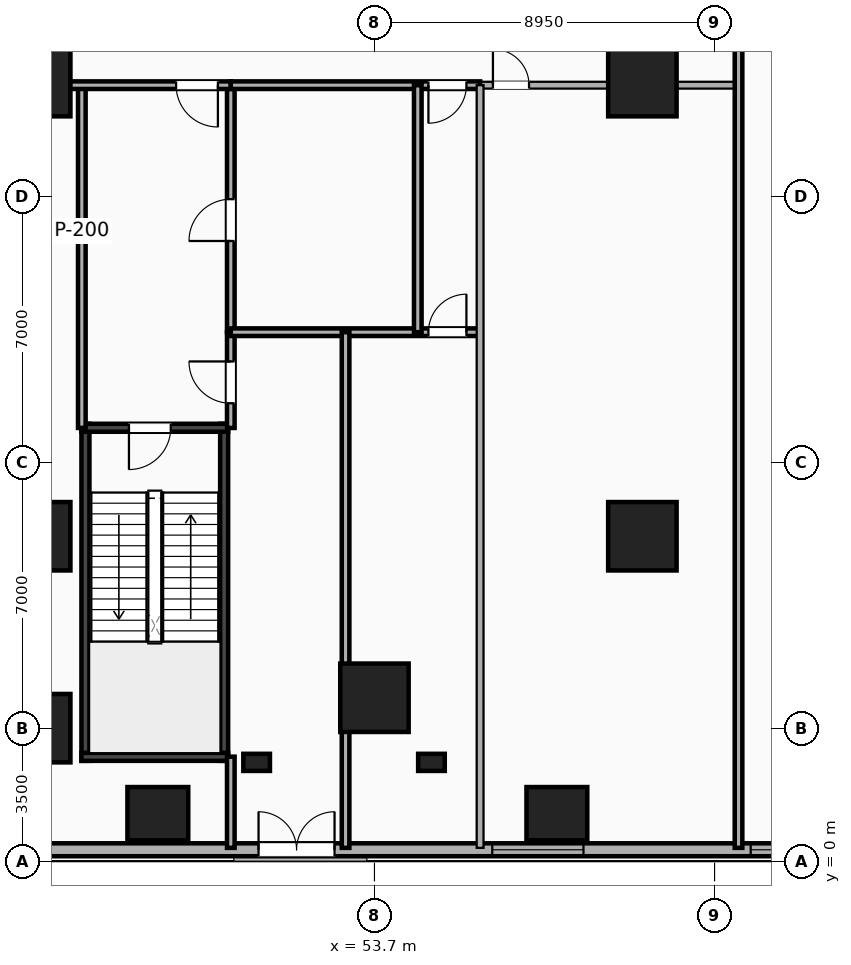
"""IFC4 building model, lengths in metres.
Left out: names, types, materials, properties, quantities, classifications, styles, units other than length and angle.
Written with IfcOpenShell. Run it as: python <this file> out.ifc"""

import sys

from ifc_helpers import new_model, si_unit, direction, frame, frame_2d, origin, origin_2d, place, context, subcontext, project, spatial, rectangle, extrude, element, fill, save


model = new_model("IFC4")
c1 = context("Model", 3, precision=1e-05, world=origin(), true_north=direction((0.0, 1.0)))
c2 = subcontext(c1, "Body", "Model", "MODEL_VIEW")
j1 = project(units=[si_unit("LENGTHUNIT", "METRE"), si_unit("PLANEANGLEUNIT", "RADIAN")], contexts=[c1])
p1 = place(None, origin())
s1 = spatial("IfcSite", under=j1, at=p1, CompositionType="ELEMENT")
p2 = place(p1, origin())
s2 = spatial("IfcBuilding", under=s1, at=p2, CompositionType="ELEMENT")
p3 = place(p2, origin())
s3 = spatial("IfcBuildingStorey", under=s2, at=p3, CompositionType="ELEMENT", Elevation=0.0)
for number, where, z_axis, x_axis in (
    (1, (46.095, 2.64, 0.0), (0.0, 0.0, 1.0), (0.0, 1.0, 0.0)),
    (2, (49.745, 2.64, 0.0), (0.0, 0.0, 1.0), (0.0, 1.0, 0.0)),
):
    element("IfcWall", number, at=place(p3, frame(where, z_axis=z_axis, x_axis=x_axis)), inside=s3, PredefinedType="SHEAR", context=c2, shape_type="SweptSolid", body=[
        extrude(rectangle(XDim=8.87, YDim=0.21, at=frame_2d((4.435, 0.0))), origin(), (0.0, 0.0, 1.0), 5.1),
    ])
p4 = place(p3, frame((45.99, 2.745, 0.0), z_axis=(0.0, 0.0, 1.0), x_axis=(1.0, 0.0, 0.0)))
e3 = element("IfcWall", 3, at=p4, inside=s3, PredefinedType="SHEAR", context=c2, shape_type="SweptSolid", body=[
    extrude(rectangle(XDim=3.86, YDim=0.21, at=frame_2d((1.93, 0.0))), origin(), (0.0, 0.0, 1.0), 5.1),
])
p5 = place(p3, frame((45.99, 11.405, 0.0), z_axis=(0.0, 0.0, 1.0), x_axis=(1.0, 0.0, 0.0)))
e4 = element("IfcWall", 4, at=p5, inside=s3, PredefinedType="SHEAR", context=c2, shape_type="SweptSolid", body=[
    extrude(rectangle(XDim=3.86, YDim=0.21, at=frame_2d((1.93, 0.0))), origin(), (0.0, 0.0, 1.0), 5.1),
])
p6 = place(p5, frame((1.25, 0.0, 0.0)))
e5 = element("IfcOpeningElement", 5, at=p6, cuts=e4, PredefinedType="OPENING", context=c2, shape_type="SweptSolid", body=[
    extrude(rectangle(XDim=1.1, YDim=2.15, at=frame_2d((0.55, 1.075))), frame((0.0, 0.115, 0.0), z_axis=(0.0, -1.0, 0.0), x_axis=(1.0, 0.0, 0.0)), (0.0, 0.0, 1.0), 0.23),
])
for number, where, z_axis, x_axis in (
    (6, (50.6, 2.6, -0.35), (0.0, 0.0, 1.0), (1.0, 0.0, 0.0)),
    (7, (55.2, 2.6, -0.35), (0.0, 0.0, 1.0), (1.0, 0.0, 0.0)),
):
    element("IfcColumn", number, at=place(p3, frame(where, z_axis=z_axis, x_axis=x_axis)), inside=s3, PredefinedType="PILASTER", context=c2, shape_type="SweptSolid", body=[
        extrude(rectangle(XDim=0.7, YDim=0.45, at=origin_2d()), origin(), (0.0, 0.0, 1.0), 5.45),
    ])
for number, where, z_axis, x_axis in (
    (8, (44.8, 3.5, -0.35), (0.0, 0.0, 1.0), (1.0, 0.0, 0.0)),
    (9, (44.8, 8.55, -0.35), (0.0, 0.0, 1.0), (1.0, 0.0, 0.0)),
    (10, (44.8, 20.5, -0.35), (0.0, 0.0, 1.0), (1.0, 0.0, 0.0)),
    (11, (60.75, 8.55, -0.35), (0.0, 0.0, 1.0), (1.0, 0.0, 0.0)),
    (12, (60.75, 20.5, -0.35), (0.0, 0.0, 1.0), (1.0, 0.0, 0.0)),
    (13, (53.7, 4.3, -0.35), (0.0, 0.0, 1.0), (1.0, 0.0, 0.0)),
):
    element("IfcColumn", number, at=place(p3, frame(where, z_axis=z_axis, x_axis=x_axis)), inside=s3, PredefinedType="COLUMN", context=c2, shape_type="SweptSolid", body=[
        extrude(rectangle(XDim=1.8, YDim=1.8, at=origin_2d()), origin(), (0.0, 0.0, 1.0), 5.45),
    ])
for number, where, z_axis, x_axis in (
    (14, (48.0, 1.25, -0.35), (0.0, 0.0, 1.0), (1.0, 0.0, 0.0)),
    (15, (58.5, 1.25, -0.35), (0.0, 0.0, 1.0), (1.0, 0.0, 0.0)),
):
    element("IfcColumn", number, at=place(p3, frame(where, z_axis=z_axis, x_axis=x_axis)), inside=s3, PredefinedType="COLUMN", context=c2, shape_type="SweptSolid", body=[
        extrude(rectangle(XDim=1.6, YDim=1.4, at=origin_2d()), origin(), (0.0, 0.0, 1.0), 5.45),
    ])
p7 = place(p3, frame((-4.7, 0.3, 0.0), z_axis=(0.0, 0.0, 1.0), x_axis=(1.0, 0.0, 0.0)))
e16 = element("IfcWall", 16, at=p7, inside=s3, PredefinedType="SOLIDWALL", context=c2, shape_type="SweptSolid", body=[
    extrude(rectangle(XDim=83.4, YDim=0.34, at=frame_2d((41.7, 0.0))), origin(), (0.0, 0.0, 1.0), 5.1),
])
p8 = place(p7, frame((24.78, 0.0, 0.0), z_axis=(0.0, 0.0, 1.0), x_axis=(-1.0, 0.0, 0.0)))
e17 = element("IfcOpeningElement", 17, at=p8, cuts=e16, PredefinedType="OPENING", context=c2, shape_type="SweptSolid", body=[
    extrude(rectangle(XDim=2.0, YDim=2.4, at=frame_2d((1.0, 1.2))), frame((0.0, 0.18, 0.0), z_axis=(0.0, -1.0, 0.0), x_axis=(1.0, 0.0, 0.0)), (0.0, 0.0, 1.0), 0.36),
])
p9 = place(p7, frame((38.85, 0.0, 0.0), z_axis=(0.0, 0.0, 1.0), x_axis=(-1.0, 0.0, 0.0)))
e18 = element("IfcOpeningElement", 18, at=p9, cuts=e16, PredefinedType="OPENING", context=c2, shape_type="SweptSolid", body=[
    extrude(rectangle(XDim=2.0, YDim=2.4, at=frame_2d((1.0, 1.2))), frame((0.0, 0.18, 0.0), z_axis=(0.0, -1.0, 0.0), x_axis=(1.0, 0.0, 0.0)), (0.0, 0.0, 1.0), 0.36),
])
p10 = place(p7, frame((57.35, 0.0, 0.0), z_axis=(0.0, 0.0, 1.0), x_axis=(-1.0, 0.0, 0.0)))
e19 = element("IfcOpeningElement", 19, at=p10, cuts=e16, PredefinedType="OPENING", context=c2, shape_type="SweptSolid", body=[
    extrude(rectangle(XDim=2.0, YDim=2.4, at=frame_2d((1.0, 1.2))), frame((0.0, 0.18, 0.0), z_axis=(0.0, -1.0, 0.0), x_axis=(1.0, 0.0, 0.0)), (0.0, 0.0, 1.0), 0.36),
])
p11 = place(p7, frame((81.0, 0.0, 0.0), z_axis=(0.0, 0.0, 1.0), x_axis=(-1.0, 0.0, 0.0)))
e20 = element("IfcOpeningElement", 20, at=p11, cuts=e16, PredefinedType="OPENING", context=c2, shape_type="SweptSolid", body=[
    extrude(rectangle(XDim=3.8, YDim=3.4, at=frame_2d((1.9, 1.7))), frame((0.0, 0.18, 0.0), z_axis=(0.0, -1.0, 0.0), x_axis=(1.0, 0.0, 0.0)), (0.0, 0.0, 1.0), 0.36),
])
p12 = place(p7, frame((9.9, 0.0, 0.9)))
e21 = element("IfcOpeningElement", 21, at=p12, cuts=e16, PredefinedType="OPENING", context=c2, shape_type="SweptSolid", body=[
    extrude(rectangle(XDim=2.4, YDim=2.6, at=frame_2d((1.2, 1.3))), frame((0.0, 0.18, 0.0), z_axis=(0.0, -1.0, 0.0), x_axis=(1.0, 0.0, 0.0)), (0.0, 0.0, 1.0), 0.36),
])
p13 = place(p7, frame((14.3, 0.0, 0.9)))
e22 = element("IfcOpeningElement", 22, at=p13, cuts=e16, PredefinedType="OPENING", context=c2, shape_type="SweptSolid", body=[
    extrude(rectangle(XDim=2.4, YDim=2.6, at=frame_2d((1.2, 1.3))), frame((0.0, 0.18, 0.0), z_axis=(0.0, -1.0, 0.0), x_axis=(1.0, 0.0, 0.0)), (0.0, 0.0, 1.0), 0.36),
])
p14 = place(p7, frame((27.5, 0.0, 0.9)))
e23 = element("IfcOpeningElement", 23, at=p14, cuts=e16, PredefinedType="OPENING", context=c2, shape_type="SweptSolid", body=[
    extrude(rectangle(XDim=2.4, YDim=2.6, at=frame_2d((1.2, 1.3))), frame((0.0, 0.18, 0.0), z_axis=(0.0, -1.0, 0.0), x_axis=(1.0, 0.0, 0.0)), (0.0, 0.0, 1.0), 0.36),
])
p15 = place(p7, frame((45.9, 0.0, 0.9)))
e24 = element("IfcOpeningElement", 24, at=p15, cuts=e16, PredefinedType="OPENING", context=c2, shape_type="SweptSolid", body=[
    extrude(rectangle(XDim=2.4, YDim=2.6, at=frame_2d((1.2, 1.3))), frame((0.0, 0.18, 0.0), z_axis=(0.0, -1.0, 0.0), x_axis=(1.0, 0.0, 0.0)), (0.0, 0.0, 1.0), 0.36),
])
p16 = place(p7, frame((61.5, 0.0, 0.9)))
e25 = element("IfcOpeningElement", 25, at=p16, cuts=e16, PredefinedType="OPENING", context=c2, shape_type="SweptSolid", body=[
    extrude(rectangle(XDim=2.4, YDim=2.6, at=frame_2d((1.2, 1.3))), frame((0.0, 0.18, 0.0), z_axis=(0.0, -1.0, 0.0), x_axis=(1.0, 0.0, 0.0)), (0.0, 0.0, 1.0), 0.36),
])
p17 = place(p7, frame((68.3, 0.0, 0.9)))
e26 = element("IfcOpeningElement", 26, at=p17, cuts=e16, PredefinedType="OPENING", context=c2, shape_type="SweptSolid", body=[
    extrude(rectangle(XDim=2.4, YDim=2.6, at=frame_2d((1.2, 1.3))), frame((0.0, 0.18, 0.0), z_axis=(0.0, -1.0, 0.0), x_axis=(1.0, 0.0, 0.0)), (0.0, 0.0, 1.0), 0.36),
])
p18 = place(p3, frame((56.48, 20.42, 0.0), z_axis=(0.0, 0.0, 1.0), x_axis=(1.0, 0.0, 0.0)))
e27 = element("IfcWall", 27, at=p18, inside=s3, PredefinedType="PARTITIONING", context=c2, shape_type="SweptSolid", body=[
    extrude(rectangle(XDim=6.8, YDim=0.18, at=frame_2d((3.4, 0.0))), origin(), (0.0, 0.0, 1.0), 4.164),
])
p19 = place(p18, frame((1.288, 0.0, 0.0), z_axis=(0.0, 0.0, 1.0), x_axis=(-1.0, 0.0, 0.0)))
e28 = element("IfcOpeningElement", 28, at=p19, cuts=e27, PredefinedType="OPENING", context=c2, shape_type="SweptSolid", body=[
    extrude(rectangle(XDim=0.95, YDim=2.15, at=frame_2d((0.475, 1.075))), frame((0.0, 0.1, 0.0), z_axis=(0.0, -1.0, 0.0), x_axis=(1.0, 0.0, 0.0)), (0.0, 0.0, 1.0), 0.2),
])
p20 = place(p3, frame((46.0, 11.4, 0.0), z_axis=(0.0, 0.0, 1.0), x_axis=(0.0, 1.0, 0.0)))
e29 = element("IfcWall", 29, at=p20, inside=s3, PredefinedType="PARTITIONING", context=c2, shape_type="SweptSolid", body=[
    extrude(rectangle(XDim=9.02, YDim=0.2, at=frame_2d((4.51, 0.0))), origin(), (0.0, 0.0, 1.0), 4.164),
])
p21 = place(p3, frame((49.92, 11.4, 0.0), z_axis=(0.0, 0.0, 1.0), x_axis=(0.0, 1.0, 0.0)))
e30 = element("IfcWall", 30, at=p21, inside=s3, PredefinedType="PARTITIONING", context=c2, shape_type="SweptSolid", body=[
    extrude(rectangle(XDim=2.52, YDim=0.2, at=frame_2d((1.26, 0.0))), origin(), (0.0, 0.0, 1.0), 5.1),
])
p22 = place(p21, frame((1.75, 0.0, 0.0), z_axis=(0.0, 0.0, 1.0), x_axis=(-1.0, 0.0, 0.0)))
e31 = element("IfcOpeningElement", 31, at=p22, cuts=e30, PredefinedType="OPENING", context=c2, shape_type="SweptSolid", body=[
    extrude(rectangle(XDim=1.1, YDim=2.15, at=frame_2d((0.55, 1.075))), frame((0.0, 0.11, 0.0), z_axis=(0.0, -1.0, 0.0), x_axis=(1.0, 0.0, 0.0)), (0.0, 0.0, 1.0), 0.22),
])
p23 = place(p3, frame((49.92, 13.92, 0.0), z_axis=(0.0, 0.0, 1.0), x_axis=(0.0, 1.0, 0.0)))
e32 = element("IfcWall", 32, at=p23, inside=s3, PredefinedType="PARTITIONING", context=c2, shape_type="SweptSolid", body=[
    extrude(rectangle(XDim=6.5, YDim=0.2, at=frame_2d((3.25, 0.0))), origin(), (0.0, 0.0, 1.0), 4.164),
])
p24 = place(p23, frame((3.5, 0.0, 0.0), z_axis=(0.0, 0.0, 1.0), x_axis=(-1.0, 0.0, 0.0)))
e33 = element("IfcOpeningElement", 33, at=p24, cuts=e32, PredefinedType="OPENING", context=c2, shape_type="SweptSolid", body=[
    extrude(rectangle(XDim=1.1, YDim=2.15, at=frame_2d((0.55, 1.075))), frame((0.0, 0.11, 0.0), z_axis=(0.0, -1.0, 0.0), x_axis=(1.0, 0.0, 0.0)), (0.0, 0.0, 1.0), 0.22),
])
p25 = place(p3, frame((49.92, 0.35, 0.0), z_axis=(0.0, 0.0, 1.0), x_axis=(0.0, 1.0, 0.0)))
e34 = element("IfcWall", 34, at=p25, inside=s3, PredefinedType="PARTITIONING", context=c2, shape_type="SweptSolid", body=[
    extrude(rectangle(XDim=2.4, YDim=0.2, at=frame_2d((1.2, 0.0))), origin(), (0.0, 0.0, 1.0), 4.164),
])
p26 = place(p3, frame((44.8, 20.42, 0.0), z_axis=(0.0, 0.0, 1.0), x_axis=(1.0, 0.0, 0.0)))
e35 = element("IfcWall", 35, at=p26, inside=s3, PredefinedType="PARTITIONING", context=c2, shape_type="SweptSolid", body=[
    extrude(rectangle(XDim=5.12, YDim=0.2, at=frame_2d((2.56, 0.0))), origin(), (0.0, 0.0, 1.0), 4.164),
])
p27 = place(p26, frame((3.681, 0.0, 0.0)))
e36 = element("IfcOpeningElement", 36, at=p27, cuts=e35, PredefinedType="OPENING", context=c2, shape_type="SweptSolid", body=[
    extrude(rectangle(XDim=1.1, YDim=2.15, at=frame_2d((0.55, 1.075))), frame((0.0, 0.11, 0.0), z_axis=(0.0, -1.0, 0.0), x_axis=(1.0, 0.0, 0.0)), (0.0, 0.0, 1.0), 0.22),
])
p28 = place(p3, frame((49.92, 20.42, 0.0), z_axis=(0.0, 0.0, 1.0), x_axis=(1.0, 0.0, 0.0)))
e37 = element("IfcWall", 37, at=p28, inside=s3, PredefinedType="PARTITIONING", context=c2, shape_type="SweptSolid", body=[
    extrude(rectangle(XDim=6.56, YDim=0.2, at=frame_2d((3.28, 0.0))), origin(), (0.0, 0.0, 1.0), 4.164),
])
p29 = place(p28, frame((5.2, 0.0, 0.0)))
e38 = element("IfcOpeningElement", 38, at=p29, cuts=e37, PredefinedType="OPENING", context=c2, shape_type="SweptSolid", body=[
    extrude(rectangle(XDim=1.0, YDim=2.15, at=frame_2d((0.5, 1.075))), frame((0.0, 0.11, 0.0), z_axis=(0.0, -1.0, 0.0), x_axis=(1.0, 0.0, 0.0)), (0.0, 0.0, 1.0), 0.22),
])
p30 = place(p3, frame((49.92, 13.92, 0.0), z_axis=(0.0, 0.0, 1.0), x_axis=(1.0, 0.0, 0.0)))
e39 = element("IfcWall", 39, at=p30, inside=s3, PredefinedType="PARTITIONING", context=c2, shape_type="SweptSolid", body=[
    extrude(rectangle(XDim=6.56, YDim=0.2, at=frame_2d((3.28, 0.0))), origin(), (0.0, 0.0, 1.0), 5.1),
])
p31 = place(p30, frame((6.2, 0.0, 0.0), z_axis=(0.0, 0.0, 1.0), x_axis=(-1.0, 0.0, 0.0)))
e40 = element("IfcOpeningElement", 40, at=p31, cuts=e39, PredefinedType="OPENING", context=c2, shape_type="SweptSolid", body=[
    extrude(rectangle(XDim=1.0, YDim=2.15, at=frame_2d((0.5, 1.075))), frame((0.0, 0.11, 0.0), z_axis=(0.0, -1.0, 0.0), x_axis=(1.0, 0.0, 0.0)), (0.0, 0.0, 1.0), 0.22),
])
p32 = place(p3, frame((63.28, 0.35, 0.0), z_axis=(0.0, 0.0, 1.0), x_axis=(0.0, 1.0, 0.0)))
e41 = element("IfcWall", 41, at=p32, inside=s3, PredefinedType="PARTITIONING", context=c2, shape_type="SweptSolid", body=[
    extrude(rectangle(XDim=22.9, YDim=0.2, at=frame_2d((11.45, 0.0))), origin(), (0.0, 0.0, 1.0), 4.164),
])
p33 = place(p32, frame((22.15, 0.0, 0.0), z_axis=(0.0, 0.0, 1.0), x_axis=(-1.0, 0.0, 0.0)))
e42 = element("IfcOpeningElement", 42, at=p33, cuts=e41, PredefinedType="OPENING", context=c2, shape_type="SweptSolid", body=[
    extrude(rectangle(XDim=1.1, YDim=2.15, at=frame_2d((0.55, 1.075))), frame((0.0, 0.11, 0.0), z_axis=(0.0, -1.0, 0.0), x_axis=(1.0, 0.0, 0.0)), (0.0, 0.0, 1.0), 0.22),
])
p34 = place(p3, frame((56.48, 0.35, 0.0), z_axis=(0.0, 0.0, 1.0), x_axis=(0.0, 1.0, 0.0)))
e43 = element("IfcWall", 43, at=p34, inside=s3, PredefinedType="PARTITIONING", context=c2, shape_type="SweptSolid", body=[
    extrude(rectangle(XDim=20.07, YDim=0.18, at=frame_2d((10.035, 0.0))), origin(), (0.0, 0.0, 1.0), 4.164),
])
p35 = place(p3, frame((52.94, 0.35, 0.0), z_axis=(0.0, 0.0, 1.0), x_axis=(0.0, 1.0, 0.0)))
e44 = element("IfcWall", 44, at=p35, inside=s3, PredefinedType="PARTITIONING", context=c2, shape_type="SweptSolid", body=[
    extrude(rectangle(XDim=13.57, YDim=0.2, at=frame_2d((6.785, 0.0))), origin(), (0.0, 0.0, 1.0), 2.735),
])
p36 = place(p3, frame((54.84, 13.92, 0.0), z_axis=(0.0, 0.0, 1.0), x_axis=(0.0, 1.0, 0.0)))
e45 = element("IfcWall", 45, at=p36, inside=s3, PredefinedType="PARTITIONING", context=c2, shape_type="SweptSolid", body=[
    extrude(rectangle(XDim=6.5, YDim=0.2, at=frame_2d((3.25, 0.0))), origin(), (0.0, 0.0, 1.0), 4.164),
])
p37 = place(p10, origin())
e46 = element("IfcDoor", 46, at=p37, inside=s3, OperationType="DOUBLE_DOOR_SINGLE_SWING", PredefinedType="DOOR", context=c2, shape_type="SweptSolid", body=[
    extrude(rectangle(XDim=2.0, YDim=2.4, at=frame_2d((1.0, 1.2))), frame((0.0, 0.025, 0.0), z_axis=(0.0, -1.0, 0.0), x_axis=(1.0, 0.0, 0.0)), (0.0, 0.0, 1.0), 0.05),
])
fill(e19, e46)
p38 = place(p16, origin())
e47 = element("IfcWindow", 47, at=p38, inside=s3, PartitioningType="SINGLE_PANEL", PredefinedType="WINDOW", context=c2, shape_type="SweptSolid", body=[
    extrude(rectangle(XDim=2.4, YDim=2.6, at=frame_2d((1.2, 1.3))), frame((0.0, 0.03, 0.0), z_axis=(0.0, -1.0, 0.0), x_axis=(1.0, 0.0, 0.0)), (0.0, 0.0, 1.0), 0.06),
])
fill(e25, e47)
p39 = place(p17, origin())
e48 = element("IfcWindow", 48, at=p39, inside=s3, PartitioningType="SINGLE_PANEL", PredefinedType="WINDOW", context=c2, shape_type="SweptSolid", body=[
    extrude(rectangle(XDim=2.4, YDim=2.6, at=frame_2d((1.2, 1.3))), frame((0.0, 0.03, 0.0), z_axis=(0.0, -1.0, 0.0), x_axis=(1.0, 0.0, 0.0)), (0.0, 0.0, 1.0), 0.06),
])
fill(e26, e48)
p40 = place(p6, origin())
e49 = element("IfcDoor", 49, at=p40, inside=s3, OperationType="SINGLE_SWING_LEFT", PredefinedType="DOOR", context=c2, shape_type="SweptSolid", body=[
    extrude(rectangle(XDim=1.1, YDim=2.15, at=frame_2d((0.55, 1.075))), frame((0.0, 0.025, 0.0), z_axis=(0.0, -1.0, 0.0), x_axis=(1.0, 0.0, 0.0)), (0.0, 0.0, 1.0), 0.05),
])
fill(e5, e49)
p41 = place(p19, origin())
e50 = element("IfcDoor", 50, at=p41, inside=s3, OperationType="SINGLE_SWING_LEFT", PredefinedType="DOOR", context=c2, shape_type="SweptSolid", body=[
    extrude(rectangle(XDim=0.95, YDim=2.15, at=frame_2d((0.475, 1.075))), frame((0.0, 0.025, 0.0), z_axis=(0.0, -1.0, 0.0), x_axis=(1.0, 0.0, 0.0)), (0.0, 0.0, 1.0), 0.05),
])
fill(e28, e50)
p42 = place(p22, origin())
e51 = element("IfcDoor", 51, at=p42, inside=s3, OperationType="SINGLE_SWING_RIGHT", PredefinedType="DOOR", context=c2, shape_type="SweptSolid", body=[
    extrude(rectangle(XDim=1.1, YDim=2.15, at=frame_2d((0.55, 1.075))), frame((0.0, 0.025, 0.0), z_axis=(0.0, -1.0, 0.0), x_axis=(1.0, 0.0, 0.0)), (0.0, 0.0, 1.0), 0.05),
])
fill(e31, e51)
p43 = place(p24, origin())
e52 = element("IfcDoor", 52, at=p43, inside=s3, OperationType="SINGLE_SWING_LEFT", PredefinedType="DOOR", context=c2, shape_type="SweptSolid", body=[
    extrude(rectangle(XDim=1.1, YDim=2.15, at=frame_2d((0.55, 1.075))), frame((0.0, 0.025, 0.0), z_axis=(0.0, -1.0, 0.0), x_axis=(1.0, 0.0, 0.0)), (0.0, 0.0, 1.0), 0.05),
])
fill(e33, e52)
p44 = place(p27, origin())
e53 = element("IfcDoor", 53, at=p44, inside=s3, OperationType="SINGLE_SWING_RIGHT", PredefinedType="DOOR", context=c2, shape_type="SweptSolid", body=[
    extrude(rectangle(XDim=1.1, YDim=2.15, at=frame_2d((0.55, 1.075))), frame((0.0, 0.025, 0.0), z_axis=(0.0, -1.0, 0.0), x_axis=(1.0, 0.0, 0.0)), (0.0, 0.0, 1.0), 0.05),
])
fill(e36, e53)
p45 = place(p29, origin())
e54 = element("IfcDoor", 54, at=p45, inside=s3, OperationType="SINGLE_SWING_LEFT", PredefinedType="DOOR", context=c2, shape_type="SweptSolid", body=[
    extrude(rectangle(XDim=1.0, YDim=2.15, at=frame_2d((0.5, 1.075))), frame((0.0, 0.025, 0.0), z_axis=(0.0, -1.0, 0.0), x_axis=(1.0, 0.0, 0.0)), (0.0, 0.0, 1.0), 0.05),
])
fill(e38, e54)
p46 = place(p31, origin())
e55 = element("IfcDoor", 55, at=p46, inside=s3, OperationType="SINGLE_SWING_RIGHT", PredefinedType="DOOR", context=c2, shape_type="SweptSolid", body=[
    extrude(rectangle(XDim=1.0, YDim=2.15, at=frame_2d((0.5, 1.075))), frame((0.0, 0.025, 0.0), z_axis=(0.0, -1.0, 0.0), x_axis=(1.0, 0.0, 0.0)), (0.0, 0.0, 1.0), 0.05),
])
fill(e40, e55)
save(model, sys.argv[1])
